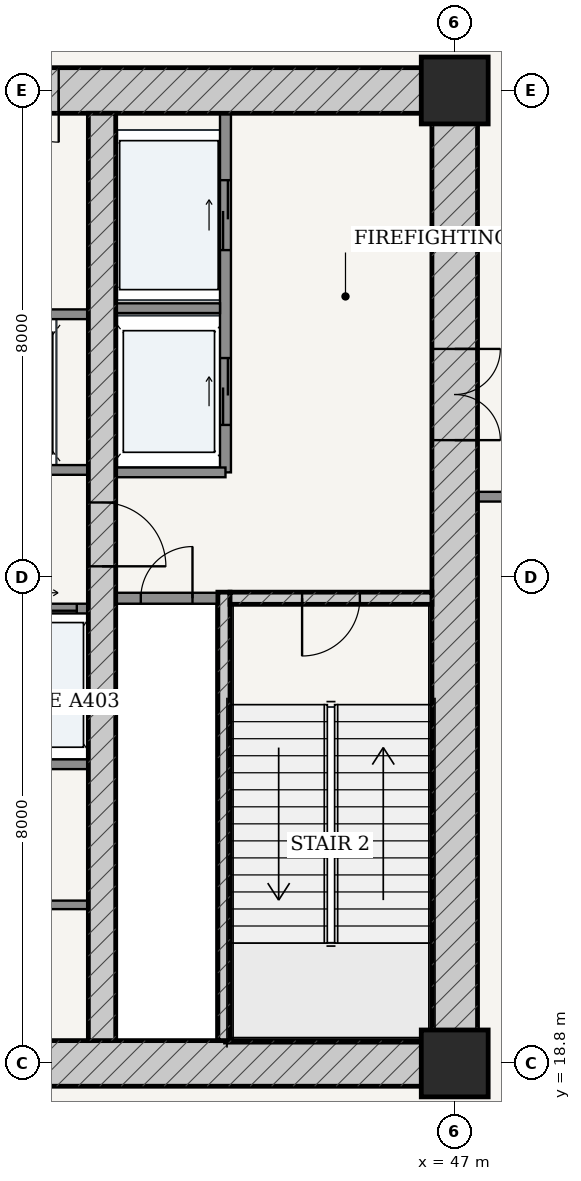
"""IFC4 building model, lengths in metres.
Left out: names, types, materials, properties, quantities, classifications, styles, units other than length and angle.
Written with IfcOpenShell. Run it as: python <this file> out.ifc"""

import sys

from ifc_helpers import new_model, si_unit, direction, frame, frame_2d, origin, origin_2d, place, context, subcontext, project, spatial, rectangle, extrude, source, transform, mapped, element, fill, save


model = new_model("IFC4")
c1 = context("Model", 3, precision=1e-05, world=origin(), true_north=direction((-0.2419218956, 0.970295726276)))
c2 = subcontext(c1, "Body", "Model", "MODEL_VIEW")
j1 = project(units=[si_unit("LENGTHUNIT", "METRE"), si_unit("PLANEANGLEUNIT", "RADIAN")], contexts=[c1])
p1 = place(None, origin())
s1 = spatial("IfcSite", under=j1, at=p1, CompositionType="ELEMENT")
p2 = place(p1, origin())
s2 = spatial("IfcBuilding", under=s1, at=p2, CompositionType="ELEMENT")
p3 = place(p2, origin())
s3 = spatial("IfcBuildingStorey", under=s2, at=p3, CompositionType="ELEMENT", Elevation=0.0)
for number, where, z_axis, x_axis in (
    (1, (47.0, 18.8, 0.0), (0.0, 0.0, 1.0), (1.0, 0.0, 0.0)),
    (2, (47.0, 34.8, 0.0), (0.0, 0.0, 1.0), (1.0, 0.0, 0.0)),
):
    element("IfcColumn", number, at=place(p3, frame(where, z_axis=z_axis, x_axis=x_axis)), inside=s3, PredefinedType="COLUMN", context=c2, shape_type="SweptSolid", body=[
        extrude(rectangle(XDim=1.1, YDim=1.1, at=origin_2d()), origin(), (0.0, 0.0, 1.0), 5.4),
    ])
p4 = place(p3, frame((28.625, 18.8, 0.0), z_axis=(0.0, 0.0, 1.0), x_axis=(1.0, 0.0, 0.0)))
e3 = element("IfcWall", 3, at=p4, inside=s3, PredefinedType="SHEAR", context=c2, shape_type="SweptSolid", body=[
    extrude(rectangle(XDim=18.75, YDim=0.75, at=frame_2d((9.375, 0.0))), origin(), (0.0, 0.0, 1.0), 5.1),
])
p5 = place(p4, frame((7.627, 0.0, 0.0)))
e4 = element("IfcOpeningElement", 4, at=p5, cuts=e3, PredefinedType="OPENING", context=c2, shape_type="SweptSolid", body=[
    extrude(rectangle(XDim=0.85, YDim=2.1, at=frame_2d((0.425, 1.05))), frame((0.0, 0.385, 0.0), z_axis=(0.0, -1.0, 0.0), x_axis=(1.0, 0.0, 0.0)), (0.0, 0.0, 1.0), 0.77),
])
p6 = place(p4, frame((10.673, 0.0, 0.0)))
e5 = element("IfcOpeningElement", 5, at=p6, cuts=e3, PredefinedType="OPENING", context=c2, shape_type="SweptSolid", body=[
    extrude(rectangle(XDim=0.85, YDim=2.1, at=frame_2d((0.425, 1.05))), frame((0.0, 0.385, 0.0), z_axis=(0.0, -1.0, 0.0), x_axis=(1.0, 0.0, 0.0)), (0.0, 0.0, 1.0), 0.77),
])
p7 = place(p3, frame((28.625, 34.8, 0.0), z_axis=(0.0, 0.0, 1.0), x_axis=(1.0, 0.0, 0.0)))
e6 = element("IfcWall", 6, at=p7, inside=s3, PredefinedType="SHEAR", context=c2, shape_type="SweptSolid", body=[
    extrude(rectangle(XDim=18.75, YDim=0.75, at=frame_2d((9.375, 0.0))), origin(), (0.0, 0.0, 1.0), 5.1),
])
p8 = place(p7, frame((6.887, 0.0, 0.0)))
e7 = element("IfcOpeningElement", 7, at=p8, cuts=e6, PredefinedType="OPENING", context=c2, shape_type="SweptSolid", body=[
    extrude(rectangle(XDim=0.85, YDim=2.1, at=frame_2d((0.425, 1.05))), frame((0.0, 0.385, 0.0), z_axis=(0.0, -1.0, 0.0), x_axis=(1.0, 0.0, 0.0)), (0.0, 0.0, 1.0), 0.77),
])
p9 = place(p7, frame((8.945, 0.0, 0.0)))
e8 = element("IfcOpeningElement", 8, at=p9, cuts=e6, PredefinedType="OPENING", context=c2, shape_type="SweptSolid", body=[
    extrude(rectangle(XDim=0.86, YDim=2.1, at=frame_2d((0.43, 1.05))), frame((0.0, 0.385, 0.0), z_axis=(0.0, -1.0, 0.0), x_axis=(1.0, 0.0, 0.0)), (0.0, 0.0, 1.0), 0.77),
])
p10 = place(p7, frame((11.012, 0.0, 0.0)))
e9 = element("IfcOpeningElement", 9, at=p10, cuts=e6, PredefinedType="OPENING", context=c2, shape_type="SweptSolid", body=[
    extrude(rectangle(XDim=0.85, YDim=2.1, at=frame_2d((0.425, 1.05))), frame((0.0, 0.385, 0.0), z_axis=(0.0, -1.0, 0.0), x_axis=(1.0, 0.0, 0.0)), (0.0, 0.0, 1.0), 0.77),
])
p11 = place(p3, frame((47.0, 19.175, 0.0), z_axis=(0.0, 0.0, 1.0), x_axis=(0.0, 1.0, 0.0)))
e10 = element("IfcWall", 10, at=p11, inside=s3, PredefinedType="SHEAR", context=c2, shape_type="SweptSolid", body=[
    extrude(rectangle(XDim=15.25, YDim=0.75, at=frame_2d((7.625, 0.0))), origin(), (0.0, 0.0, 1.0), 5.1),
])
p12 = place(p11, frame((9.875, 0.0, 0.0)))
e11 = element("IfcOpeningElement", 11, at=p12, cuts=e10, PredefinedType="OPENING", context=c2, shape_type="SweptSolid", body=[
    extrude(rectangle(XDim=1.5, YDim=2.2, at=frame_2d((0.75, 1.1))), frame((0.0, 0.385, 0.0), z_axis=(0.0, -1.0, 0.0), x_axis=(1.0, 0.0, 0.0)), (0.0, 0.0, 1.0), 0.77),
])
p13 = place(p3, frame((43.205, 19.175, 0.0), z_axis=(0.0, 0.0, 1.0), x_axis=(0.0, 1.0, 0.0)))
e12 = element("IfcWall", 12, at=p13, inside=s3, PredefinedType="SOLIDWALL", context=c2, shape_type="SweptSolid", body=[
    extrude(rectangle(XDim=7.375, YDim=0.2, at=frame_2d((3.688, 0.0))), origin(), (0.0, 0.0, 1.0), 5.1),
])
p14 = place(p3, frame((43.305, 26.45, 0.0), z_axis=(0.0, 0.0, 1.0), x_axis=(1.0, 0.0, 0.0)))
e13 = element("IfcWall", 13, at=p14, inside=s3, PredefinedType="SOLIDWALL", context=c2, shape_type="SweptSolid", body=[
    extrude(rectangle(XDim=3.32, YDim=0.2, at=frame_2d((1.66, 0.0))), origin(), (0.0, 0.0, 1.0), 5.1),
])
p15 = place(p14, frame((1.185, 0.0, 0.0)))
e14 = element("IfcOpeningElement", 14, at=p15, cuts=e13, PredefinedType="OPENING", context=c2, shape_type="SweptSolid", body=[
    extrude(rectangle(XDim=0.95, YDim=2.15, at=frame_2d((0.475, 1.075))), frame((0.0, 0.11, 0.0), z_axis=(0.0, -1.0, 0.0), x_axis=(1.0, 0.0, 0.0)), (0.0, 0.0, 1.0), 0.22),
])
p16 = place(p3, frame((41.2, 19.175, 0.0), z_axis=(0.0, 0.0, 1.0), x_axis=(0.0, 1.0, 0.0)))
e15 = element("IfcWall", 15, at=p16, inside=s3, PredefinedType="SHEAR", context=c2, shape_type="SweptSolid", body=[
    extrude(rectangle(XDim=15.25, YDim=0.45, at=frame_2d((7.625, 0.0))), origin(), (0.0, 0.0, 1.0), 5.1),
])
p17 = place(p16, frame((7.8, 0.0, 0.0)))
e16 = element("IfcOpeningElement", 16, at=p17, cuts=e15, PredefinedType="OPENING", context=c2, shape_type="SweptSolid", body=[
    extrude(rectangle(XDim=1.05, YDim=2.15, at=frame_2d((0.525, 1.075))), frame((0.0, 0.235, 0.0), z_axis=(0.0, -1.0, 0.0), x_axis=(1.0, 0.0, 0.0)), (0.0, 0.0, 1.0), 0.47),
])
p18 = place(p3, frame((41.425, 26.45, 0.0), z_axis=(0.0, 0.0, 1.0), x_axis=(1.0, 0.0, 0.0)))
e17 = element("IfcWall", 17, at=p18, inside=s3, PredefinedType="PARTITIONING", context=c2, shape_type="SweptSolid", body=[
    extrude(rectangle(XDim=1.675, YDim=0.18, at=frame_2d((0.837, 0.0))), origin(), (0.0, 0.0, 1.0), 5.1),
])
p19 = place(p18, frame((0.413, 0.0, 0.0)))
e18 = element("IfcOpeningElement", 18, at=p19, cuts=e17, PredefinedType="OPENING", context=c2, shape_type="SweptSolid", body=[
    extrude(rectangle(XDim=0.85, YDim=2.1, at=frame_2d((0.425, 1.05))), frame((0.0, 0.1, 0.0), z_axis=(0.0, -1.0, 0.0), x_axis=(1.0, 0.0, 0.0)), (0.0, 0.0, 1.0), 0.2),
])
p20 = place(p3, frame((43.23, 28.52, 0.0), z_axis=(0.0, 0.0, 1.0), x_axis=(0.0, 1.0, 0.0)))
e19 = element("IfcWall", 19, at=p20, inside=s3, PredefinedType="PARTITIONING", context=c2, shape_type="SweptSolid", body=[
    extrude(rectangle(XDim=5.905, YDim=0.18, at=frame_2d((2.953, 0.0))), origin(), (0.0, 0.0, 1.0), 5.1),
])
p21 = place(p20, frame((3.655, 0.0, 0.0)))
e20 = element("IfcOpeningElement", 20, at=p21, cuts=e19, PredefinedType="OPENING", context=c2, shape_type="SweptSolid", body=[
    extrude(rectangle(XDim=1.15, YDim=2.2, at=frame_2d((0.575, 1.1))), frame((0.0, 0.1, 0.0), z_axis=(0.0, -1.0, 0.0), x_axis=(1.0, 0.0, 0.0)), (0.0, 0.0, 1.0), 0.2),
])
p22 = place(p20, frame((0.78, 0.0, 0.0)))
e21 = element("IfcOpeningElement", 21, at=p22, cuts=e19, PredefinedType="OPENING", context=c2, shape_type="SweptSolid", body=[
    extrude(rectangle(XDim=1.1, YDim=2.2, at=frame_2d((0.55, 1.1))), frame((0.0, 0.1, 0.0), z_axis=(0.0, -1.0, 0.0), x_axis=(1.0, 0.0, 0.0)), (0.0, 0.0, 1.0), 0.2),
])
p23 = place(p3, frame((41.425, 31.22, 0.0), z_axis=(0.0, 0.0, 1.0), x_axis=(1.0, 0.0, 0.0)))
e22 = element("IfcWall", 22, at=p23, inside=s3, PredefinedType="PARTITIONING", context=c2, shape_type="SweptSolid", body=[
    extrude(rectangle(XDim=1.715, YDim=0.16, at=frame_2d((0.857, 0.0))), origin(), (0.0, 0.0, 1.0), 5.1),
])
p24 = place(p3, frame((41.425, 28.52, 0.0), z_axis=(0.0, 0.0, 1.0), x_axis=(1.0, 0.0, 0.0)))
e23 = element("IfcWall", 23, at=p24, inside=s3, PredefinedType="PARTITIONING", context=c2, shape_type="SweptSolid", body=[
    extrude(rectangle(XDim=1.805, YDim=0.16, at=frame_2d((0.902, 0.0))), origin(), (0.0, 0.0, 1.0), 5.1),
])
p25 = place(p3, frame((35.025, 28.56, 0.0), z_axis=(0.0, 0.0, 1.0), x_axis=(1.0, 0.0, 0.0)))
e24 = element("IfcWall", 24, at=p25, inside=s3, PredefinedType="PARTITIONING", context=c2, shape_type="SweptSolid", body=[
    extrude(rectangle(XDim=5.95, YDim=0.16, at=frame_2d((2.975, 0.0))), origin(), (0.0, 0.0, 1.0), 5.1),
])
p26 = place(p25, frame((0.76, 0.0, 0.0)))
e25 = element("IfcOpeningElement", 25, at=p26, cuts=e24, PredefinedType="OPENING", context=c2, shape_type="SweptSolid", body=[
    extrude(rectangle(XDim=1.1, YDim=2.2, at=frame_2d((0.55, 1.1))), frame((0.0, 0.09, 0.0), z_axis=(0.0, -1.0, 0.0), x_axis=(1.0, 0.0, 0.0)), (0.0, 0.0, 1.0), 0.18),
])
p27 = place(p25, frame((2.425, 0.0, 0.0)))
e26 = element("IfcOpeningElement", 26, at=p27, cuts=e24, PredefinedType="OPENING", context=c2, shape_type="SweptSolid", body=[
    extrude(rectangle(XDim=1.1, YDim=2.2, at=frame_2d((0.55, 1.1))), frame((0.0, 0.09, 0.0), z_axis=(0.0, -1.0, 0.0), x_axis=(1.0, 0.0, 0.0)), (0.0, 0.0, 1.0), 0.18),
])
p28 = place(p25, frame((4.09, 0.0, 0.0)))
e27 = element("IfcOpeningElement", 27, at=p28, cuts=e24, PredefinedType="OPENING", context=c2, shape_type="SweptSolid", body=[
    extrude(rectangle(XDim=1.1, YDim=2.2, at=frame_2d((0.55, 1.1))), frame((0.0, 0.09, 0.0), z_axis=(0.0, -1.0, 0.0), x_axis=(1.0, 0.0, 0.0)), (0.0, 0.0, 1.0), 0.18),
])
p29 = place(p3, frame((35.025, 31.12, 0.0), z_axis=(0.0, 0.0, 1.0), x_axis=(1.0, 0.0, 0.0)))
e28 = element("IfcWall", 28, at=p29, inside=s3, PredefinedType="PARTITIONING", context=c2, shape_type="SweptSolid", body=[
    extrude(rectangle(XDim=5.95, YDim=0.16, at=frame_2d((2.975, 0.0))), origin(), (0.0, 0.0, 1.0), 5.1),
])
p30 = place(p3, frame((35.025, 26.28, 0.0), z_axis=(0.0, 0.0, 1.0), x_axis=(1.0, 0.0, 0.0)))
e29 = element("IfcWall", 29, at=p30, inside=s3, PredefinedType="PARTITIONING", context=c2, shape_type="SweptSolid", body=[
    extrude(rectangle(XDim=5.95, YDim=0.16, at=frame_2d((2.975, 0.0))), origin(), (0.0, 0.0, 1.0), 5.1),
])
p31 = place(p30, frame((0.19, 0.0, 0.0)))
e30 = element("IfcOpeningElement", 30, at=p31, cuts=e29, PredefinedType="OPENING", context=c2, shape_type="SweptSolid", body=[
    extrude(rectangle(XDim=1.1, YDim=2.2, at=frame_2d((0.55, 1.1))), frame((0.0, 0.09, 0.0), z_axis=(0.0, -1.0, 0.0), x_axis=(1.0, 0.0, 0.0)), (0.0, 0.0, 1.0), 0.18),
])
p32 = place(p30, frame((1.67, 0.0, 0.0)))
e31 = element("IfcOpeningElement", 31, at=p32, cuts=e29, PredefinedType="OPENING", context=c2, shape_type="SweptSolid", body=[
    extrude(rectangle(XDim=1.1, YDim=2.2, at=frame_2d((0.55, 1.1))), frame((0.0, 0.09, 0.0), z_axis=(0.0, -1.0, 0.0), x_axis=(1.0, 0.0, 0.0)), (0.0, 0.0, 1.0), 0.18),
])
p33 = place(p30, frame((3.18, 0.0, 0.0)))
e32 = element("IfcOpeningElement", 32, at=p33, cuts=e29, PredefinedType="OPENING", context=c2, shape_type="SweptSolid", body=[
    extrude(rectangle(XDim=1.1, YDim=2.2, at=frame_2d((0.55, 1.1))), frame((0.0, 0.09, 0.0), z_axis=(0.0, -1.0, 0.0), x_axis=(1.0, 0.0, 0.0)), (0.0, 0.0, 1.0), 0.18),
])
p34 = place(p30, frame((4.66, 0.0, 0.0)))
e33 = element("IfcOpeningElement", 33, at=p34, cuts=e29, PredefinedType="OPENING", context=c2, shape_type="SweptSolid", body=[
    extrude(rectangle(XDim=1.1, YDim=2.2, at=frame_2d((0.55, 1.1))), frame((0.0, 0.09, 0.0), z_axis=(0.0, -1.0, 0.0), x_axis=(1.0, 0.0, 0.0)), (0.0, 0.0, 1.0), 0.18),
])
p35 = place(p3, frame((35.025, 23.72, 0.0), z_axis=(0.0, 0.0, 1.0), x_axis=(1.0, 0.0, 0.0)))
e34 = element("IfcWall", 34, at=p35, inside=s3, PredefinedType="PARTITIONING", context=c2, shape_type="SweptSolid", body=[
    extrude(rectangle(XDim=5.95, YDim=0.16, at=frame_2d((2.975, 0.0))), origin(), (0.0, 0.0, 1.0), 5.1),
])
p36 = place(p3, frame((38.4, 21.407, 0.0), z_axis=(0.0, 0.0, 1.0), x_axis=(1.0, 0.0, 0.0)))
e35 = element("IfcWall", 35, at=p36, inside=s3, PredefinedType="PARTITIONING", context=c2, shape_type="SweptSolid", body=[
    extrude(rectangle(XDim=2.575, YDim=0.14, at=frame_2d((1.288, 0.0))), origin(), (0.0, 0.0, 1.0), 5.1),
])
p37 = place(p36, frame((0.863, 0.0, 0.0)))
e36 = element("IfcOpeningElement", 36, at=p37, cuts=e35, PredefinedType="OPENING", context=c2, shape_type="SweptSolid", body=[
    extrude(rectangle(XDim=0.85, YDim=2.1, at=frame_2d((0.425, 1.05))), frame((0.0, 0.08, 0.0), z_axis=(0.0, -1.0, 0.0), x_axis=(1.0, 0.0, 0.0)), (0.0, 0.0, 1.0), 0.16),
])
p38 = place(p3, frame((47.375, 28.12, 0.0), z_axis=(0.0, 0.0, 1.0), x_axis=(1.0, 0.0, 0.0)))
e37 = element("IfcWall", 37, at=p38, inside=s3, PredefinedType="PARTITIONING", context=c2, shape_type="SweptSolid", body=[
    extrude(rectangle(XDim=2.505, YDim=0.16, at=frame_2d((1.252, 0.0))), origin(), (0.0, 0.0, 1.0), 4.45),
])
m1 = source(origin(), c2, "Body", "SweptSolid", [
    extrude(rectangle(XDim=1.5, YDim=2.2, at=frame_2d((0.75, 1.1))), frame((0.0, 0.025, 0.0), z_axis=(0.0, -1.0, 0.0), x_axis=(1.0, 0.0, 0.0)), (0.0, 0.0, 1.0), 0.05),
])
p39 = place(p12, frame((1.5, 0.0, 0.0), z_axis=(0.0, 0.0, 1.0), x_axis=(-1.0, 0.0, 0.0)))
e38 = element("IfcDoor", 38, at=p39, inside=s3, OperationType="DOUBLE_DOOR_SINGLE_SWING", PredefinedType="DOOR", context=c2, shape_type="MappedRepresentation", body=[
    mapped(m1, transform((0.0, 0.0, 0.0), scale=1.0)),
])
fill(e11, e38)
m2 = source(origin(), c2, "Body", "SweptSolid", [
    extrude(rectangle(XDim=1.05, YDim=2.15, at=frame_2d((0.525, 1.075))), frame((0.0, 0.025, 0.0), z_axis=(0.0, -1.0, 0.0), x_axis=(1.0, 0.0, 0.0)), (0.0, 0.0, 1.0), 0.05),
])
p40 = place(p17, frame((1.05, 0.0, 0.0), z_axis=(0.0, 0.0, 1.0), x_axis=(-1.0, 0.0, 0.0)))
e39 = element("IfcDoor", 39, at=p40, inside=s3, OperationType="SINGLE_SWING_RIGHT", PredefinedType="DOOR", context=c2, shape_type="MappedRepresentation", body=[
    mapped(m2, transform((0.0, 0.0, 0.0), scale=1.0)),
])
fill(e16, e39)
m3 = source(origin(), c2, "Body", "SweptSolid", [
    extrude(rectangle(XDim=0.95, YDim=2.15, at=frame_2d((0.475, 1.075))), frame((0.0, 0.025, 0.0), z_axis=(0.0, -1.0, 0.0), x_axis=(1.0, 0.0, 0.0)), (0.0, 0.0, 1.0), 0.05),
])
p41 = place(p15, frame((0.95, 0.0, 0.0), z_axis=(0.0, 0.0, 1.0), x_axis=(-1.0, 0.0, 0.0)))
e40 = element("IfcDoor", 40, at=p41, inside=s3, OperationType="SINGLE_SWING_RIGHT", PredefinedType="DOOR", context=c2, shape_type="MappedRepresentation", body=[
    mapped(m3, transform((0.0, 0.0, 0.0), scale=1.0)),
])
fill(e14, e40)
m4 = source(origin(), c2, "Body", "SweptSolid", [
    extrude(rectangle(XDim=0.85, YDim=2.1, at=frame_2d((0.425, 1.05))), frame((0.0, 0.025, 0.0), z_axis=(0.0, -1.0, 0.0), x_axis=(1.0, 0.0, 0.0)), (0.0, 0.0, 1.0), 0.05),
])
p42 = place(p19, origin())
e41 = element("IfcDoor", 41, at=p42, inside=s3, OperationType="SINGLE_SWING_RIGHT", PredefinedType="DOOR", context=c2, shape_type="MappedRepresentation", body=[
    mapped(m4, transform((0.0, 0.0, 0.0), scale=1.0)),
])
fill(e18, e41)
p43 = place(p10, frame((0.85, 0.0, 0.0), z_axis=(0.0, 0.0, 1.0), x_axis=(-1.0, 0.0, 0.0)))
e42 = element("IfcDoor", 42, at=p43, inside=s3, OperationType="SINGLE_SWING_LEFT", PredefinedType="DOOR", context=c2, shape_type="MappedRepresentation", body=[
    mapped(m4, transform((0.0, 0.0, 0.0), scale=1.0)),
])
fill(e9, e42)
m5 = source(origin(), c2, "Body", "SweptSolid", [
    extrude(rectangle(XDim=1.15, YDim=2.2, at=frame_2d((0.575, 1.1))), frame((0.0, 0.025, 0.0), z_axis=(0.0, -1.0, 0.0), x_axis=(1.0, 0.0, 0.0)), (0.0, 0.0, 1.0), 0.05),
])
p44 = place(p21, origin())
e43 = element("IfcDoor", 43, at=p44, inside=s3, OperationType="DOUBLE_DOOR_SLIDING", PredefinedType="DOOR", context=c2, shape_type="MappedRepresentation", body=[
    mapped(m5, transform((0.0, 0.0, 0.0), scale=1.0)),
])
fill(e20, e43)
m6 = source(origin(), c2, "Body", "SweptSolid", [
    extrude(rectangle(XDim=1.1, YDim=2.2, at=frame_2d((0.55, 1.1))), frame((0.0, 0.025, 0.0), z_axis=(0.0, -1.0, 0.0), x_axis=(1.0, 0.0, 0.0)), (0.0, 0.0, 1.0), 0.05),
])
p45 = place(p22, origin())
e44 = element("IfcDoor", 44, at=p45, inside=s3, OperationType="DOUBLE_DOOR_SLIDING", PredefinedType="DOOR", context=c2, shape_type="MappedRepresentation", body=[
    mapped(m6, transform((0.0, 0.0, 0.0), scale=1.0)),
])
fill(e21, e44)
p46 = place(p34, origin())
e45 = element("IfcDoor", 45, at=p46, inside=s3, OperationType="DOUBLE_DOOR_SLIDING", PredefinedType="DOOR", context=c2, shape_type="MappedRepresentation", body=[
    mapped(m6, transform((0.0, 0.0, 0.0), scale=1.0)),
])
fill(e33, e45)
save(model, sys.argv[1])
